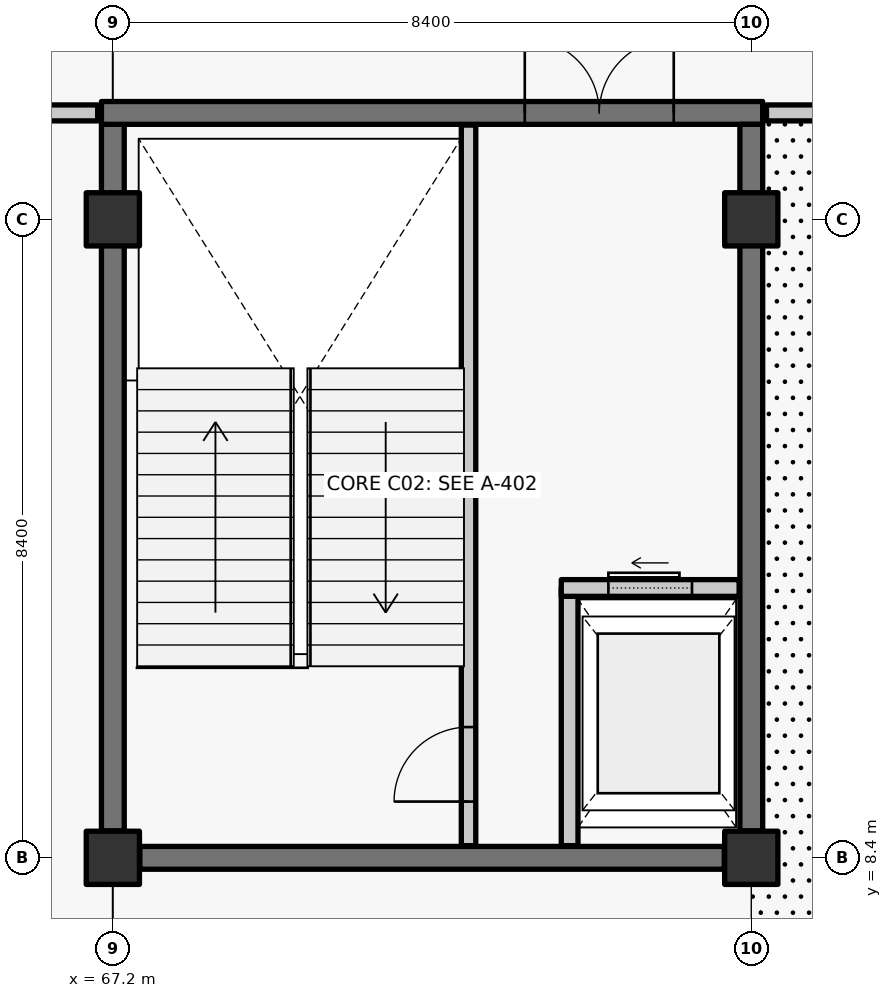
"""IFC4 building model, lengths in metres.
Left out: names, types, materials, properties, quantities, classifications, styles, units other than length and angle.
Written with IfcOpenShell. Run it as: python <this file> out.ifc"""

import sys

from ifc_helpers import new_model, si_unit, direction, frame, frame_2d, origin, origin_2d, place, context, subcontext, project, spatial, rectangle, extrude, element, fill, save


model = new_model("IFC4")
c1 = context("Model", 3, precision=1e-05, world=origin(), true_north=direction((0.0, 1.0)))
c2 = subcontext(c1, "Body", "Model", "MODEL_VIEW")
j1 = project(units=[si_unit("LENGTHUNIT", "METRE"), si_unit("PLANEANGLEUNIT", "RADIAN")], contexts=[c1])
p1 = place(None, origin())
s1 = spatial("IfcSite", under=j1, at=p1, CompositionType="ELEMENT")
p2 = place(p1, origin())
s2 = spatial("IfcBuilding", under=s1, at=p2, CompositionType="ELEMENT")
p3 = place(p2, frame((0.0, 0.0, 11.4)))
s3 = spatial("IfcBuildingStorey", under=s2, at=p3, CompositionType="ELEMENT", Elevation=11.4)
for number, where, z_axis, x_axis in (
    (1, (67.2, 8.4, 0.0), (0.0, 0.0, 1.0), (1.0, 0.0, 0.0)),
    (2, (67.2, 16.8, 0.0), (0.0, 0.0, 1.0), (1.0, 0.0, 0.0)),
    (3, (75.6, 8.4, 0.0), (0.0, 0.0, 1.0), (1.0, 0.0, 0.0)),
    (4, (75.6, 16.8, 0.0), (0.0, 0.0, 1.0), (1.0, 0.0, 0.0)),
):
    element("IfcColumn", number, at=place(p3, frame(where, z_axis=z_axis, x_axis=x_axis)), inside=s3, PredefinedType="COLUMN", context=c2, shape_type="SweptSolid", body=[
        extrude(rectangle(XDim=0.7, YDim=0.7, at=origin_2d()), origin(), (0.0, 0.0, 1.0), 4.8),
    ])
p4 = place(p3, frame((75.245, 8.4, 0.0), z_axis=(0.0, 0.0, 1.0), x_axis=(-1.0, 0.0, 0.0)))
e5 = element("IfcWall", 5, at=p4, inside=s3, PredefinedType="SHEAR", context=c2, shape_type="SweptSolid", body=[
    extrude(rectangle(XDim=7.69, YDim=0.3, at=frame_2d((3.845, 0.0))), origin(), (0.0, 0.0, 1.0), 4.52),
])
p5 = place(p3, frame((67.2, 8.755, 0.0), z_axis=(0.0, 0.0, 1.0), x_axis=(0.0, 1.0, 0.0)))
e6 = element("IfcWall", 6, at=p5, inside=s3, PredefinedType="SHEAR", context=c2, shape_type="SweptSolid", body=[
    extrude(rectangle(XDim=9.295, YDim=0.3, at=frame_2d((4.647, 0.0))), origin(), (0.0, 0.0, 1.0), 4.52),
])
p6 = place(p3, frame((67.05, 18.2, 0.0), z_axis=(0.0, 0.0, 1.0), x_axis=(1.0, 0.0, 0.0)))
e7 = element("IfcWall", 7, at=p6, inside=s3, PredefinedType="SHEAR", context=c2, shape_type="SweptSolid", body=[
    extrude(rectangle(XDim=8.7, YDim=0.3, at=frame_2d((4.35, 0.0))), origin(), (0.0, 0.0, 1.0), 4.52),
])
p7 = place(p6, frame((5.57, 0.0, 0.0)))
e8 = element("IfcOpeningElement", 8, at=p7, cuts=e7, PredefinedType="OPENING", context=c2, shape_type="SweptSolid", body=[
    extrude(rectangle(XDim=1.96, YDim=2.2, at=frame_2d((0.98, 1.1))), frame((0.0, 0.16, 0.0), z_axis=(0.0, -1.0, 0.0), x_axis=(1.0, 0.0, 0.0)), (0.0, 0.0, 1.0), 0.32),
])
p8 = place(p3, frame((75.6, 18.05, 0.0), z_axis=(0.0, 0.0, 1.0), x_axis=(0.0, -1.0, 0.0)))
e9 = element("IfcWall", 9, at=p8, inside=s3, PredefinedType="SHEAR", context=c2, shape_type="SweptSolid", body=[
    extrude(rectangle(XDim=9.295, YDim=0.3, at=frame_2d((4.647, 0.0))), origin(), (0.0, 0.0, 1.0), 4.52),
])
p9 = place(p3, frame((71.88, 8.56, 0.0), z_axis=(0.0, 0.0, 1.0), x_axis=(0.0, 1.0, 0.0)))
e10 = element("IfcWall", 10, at=p9, inside=s3, PredefinedType="SOLIDWALL", context=c2, shape_type="SweptSolid", body=[
    extrude(rectangle(XDim=9.48, YDim=0.19, at=frame_2d((4.74, 0.0))), origin(), (0.0, 0.0, 1.0), 4.52),
])
p10 = place(p9, frame((0.58, 0.0, 0.0)))
e11 = element("IfcOpeningElement", 11, at=p10, cuts=e10, PredefinedType="OPENING", context=c2, shape_type="SweptSolid", body=[
    extrude(rectangle(XDim=0.98, YDim=2.15, at=frame_2d((0.49, 1.075))), frame((0.0, 0.105, 0.0), z_axis=(0.0, -1.0, 0.0), x_axis=(1.0, 0.0, 0.0)), (0.0, 0.0, 1.0), 0.21),
])
p11 = place(p3, frame((73.21, 8.56, 0.0), z_axis=(0.0, 0.0, 1.0), x_axis=(0.0, 1.0, 0.0)))
e12 = element("IfcWall", 12, at=p11, inside=s3, PredefinedType="SOLIDWALL", context=c2, shape_type="SweptSolid", body=[
    extrude(rectangle(XDim=3.39, YDim=0.22, at=frame_2d((1.695, 0.0))), origin(), (0.0, 0.0, 1.0), 4.52),
])
p12 = place(p3, frame((73.1, 11.95, 0.0), z_axis=(0.0, 0.0, 1.0), x_axis=(1.0, 0.0, 0.0)))
e13 = element("IfcWall", 13, at=p12, inside=s3, PredefinedType="SOLIDWALL", context=c2, shape_type="SweptSolid", body=[
    extrude(rectangle(XDim=2.34, YDim=0.22, at=frame_2d((1.17, 0.0))), origin(), (0.0, 0.0, 1.0), 4.52),
])
p13 = place(p12, frame((0.62, 0.0, 0.0)))
e14 = element("IfcOpeningElement", 14, at=p13, cuts=e13, PredefinedType="OPENING", context=c2, shape_type="SweptSolid", body=[
    extrude(rectangle(XDim=1.1, YDim=2.2, at=frame_2d((0.55, 1.1))), frame((0.0, 0.12, 0.0), z_axis=(0.0, -1.0, 0.0), x_axis=(1.0, 0.0, 0.0)), (0.0, 0.0, 1.0), 0.24),
])
p14 = place(p3, frame((33.8, 18.2, 0.0), z_axis=(0.0, 0.0, 1.0), x_axis=(1.0, 0.0, 0.0)))
e15 = element("IfcWall", 15, at=p14, inside=s3, PredefinedType="PARTITIONING", context=c2, shape_type="SweptSolid", body=[
    extrude(rectangle(XDim=33.2, YDim=0.21, at=frame_2d((16.6, 0.0))), origin(), (0.0, 0.0, 1.0), 4.52),
])
p15 = place(p14, frame((3.5, 0.0, 0.0)))
e16 = element("IfcOpeningElement", 16, at=p15, cuts=e15, PredefinedType="OPENING", context=c2, shape_type="SweptSolid", body=[
    extrude(rectangle(XDim=1.0, YDim=2.15, at=frame_2d((0.5, 1.075))), frame((0.0, 0.115, 0.0), z_axis=(0.0, -1.0, 0.0), x_axis=(1.0, 0.0, 0.0)), (0.0, 0.0, 1.0), 0.23),
])
p16 = place(p14, frame((20.3, 0.0, 0.0)))
e17 = element("IfcOpeningElement", 17, at=p16, cuts=e15, PredefinedType="OPENING", context=c2, shape_type="SweptSolid", body=[
    extrude(rectangle(XDim=1.0, YDim=2.15, at=frame_2d((0.5, 1.075))), frame((0.0, 0.115, 0.0), z_axis=(0.0, -1.0, 0.0), x_axis=(1.0, 0.0, 0.0)), (0.0, 0.0, 1.0), 0.23),
])
p17 = place(p3, frame((75.8, 18.2, 0.0), z_axis=(0.0, 0.0, 1.0), x_axis=(1.0, 0.0, 0.0)))
e18 = element("IfcWall", 18, at=p17, inside=s3, PredefinedType="PARTITIONING", context=c2, shape_type="SweptSolid", body=[
    extrude(rectangle(XDim=16.4, YDim=0.21, at=frame_2d((8.2, 0.0))), origin(), (0.0, 0.0, 1.0), 4.52),
])
p18 = place(p17, frame((3.5, 0.0, 0.0)))
e19 = element("IfcOpeningElement", 19, at=p18, cuts=e18, PredefinedType="OPENING", context=c2, shape_type="SweptSolid", body=[
    extrude(rectangle(XDim=1.0, YDim=2.15, at=frame_2d((0.5, 1.075))), frame((0.0, 0.115, 0.0), z_axis=(0.0, -1.0, 0.0), x_axis=(1.0, 0.0, 0.0)), (0.0, 0.0, 1.0), 0.23),
])
p19 = place(p17, frame((11.9, 0.0, 0.0)))
e20 = element("IfcOpeningElement", 20, at=p19, cuts=e18, PredefinedType="OPENING", context=c2, shape_type="SweptSolid", body=[
    extrude(rectangle(XDim=1.0, YDim=2.15, at=frame_2d((0.5, 1.075))), frame((0.0, 0.115, 0.0), z_axis=(0.0, -1.0, 0.0), x_axis=(1.0, 0.0, 0.0)), (0.0, 0.0, 1.0), 0.23),
])
p20 = place(p10, origin())
e21 = element("IfcDoor", 21, at=p20, inside=s3, OperationType="SINGLE_SWING_LEFT", PredefinedType="DOOR", context=c2, shape_type="SweptSolid", body=[
    extrude(rectangle(XDim=0.98, YDim=2.15, at=frame_2d((0.49, 1.075))), frame((0.0, 0.025, 0.0), z_axis=(0.0, -1.0, 0.0), x_axis=(1.0, 0.0, 0.0)), (0.0, 0.0, 1.0), 0.05),
])
fill(e11, e21)
p21 = place(p7, origin())
e22 = element("IfcDoor", 22, at=p21, inside=s3, OperationType="DOUBLE_DOOR_SINGLE_SWING", PredefinedType="DOOR", context=c2, shape_type="SweptSolid", body=[
    extrude(rectangle(XDim=1.96, YDim=2.2, at=frame_2d((0.98, 1.1))), frame((0.0, 0.025, 0.0), z_axis=(0.0, -1.0, 0.0), x_axis=(1.0, 0.0, 0.0)), (0.0, 0.0, 1.0), 0.05),
])
fill(e8, e22)
p22 = place(p13, origin())
e23 = element("IfcDoor", 23, at=p22, inside=s3, OperationType="SLIDING_TO_LEFT", PredefinedType="DOOR", context=c2, shape_type="SweptSolid", body=[
    extrude(rectangle(XDim=1.1, YDim=2.2, at=frame_2d((0.55, 1.1))), frame((0.0, 0.025, 0.0), z_axis=(0.0, -1.0, 0.0), x_axis=(1.0, 0.0, 0.0)), (0.0, 0.0, 1.0), 0.05),
])
fill(e14, e23)
save(model, sys.argv[1])
